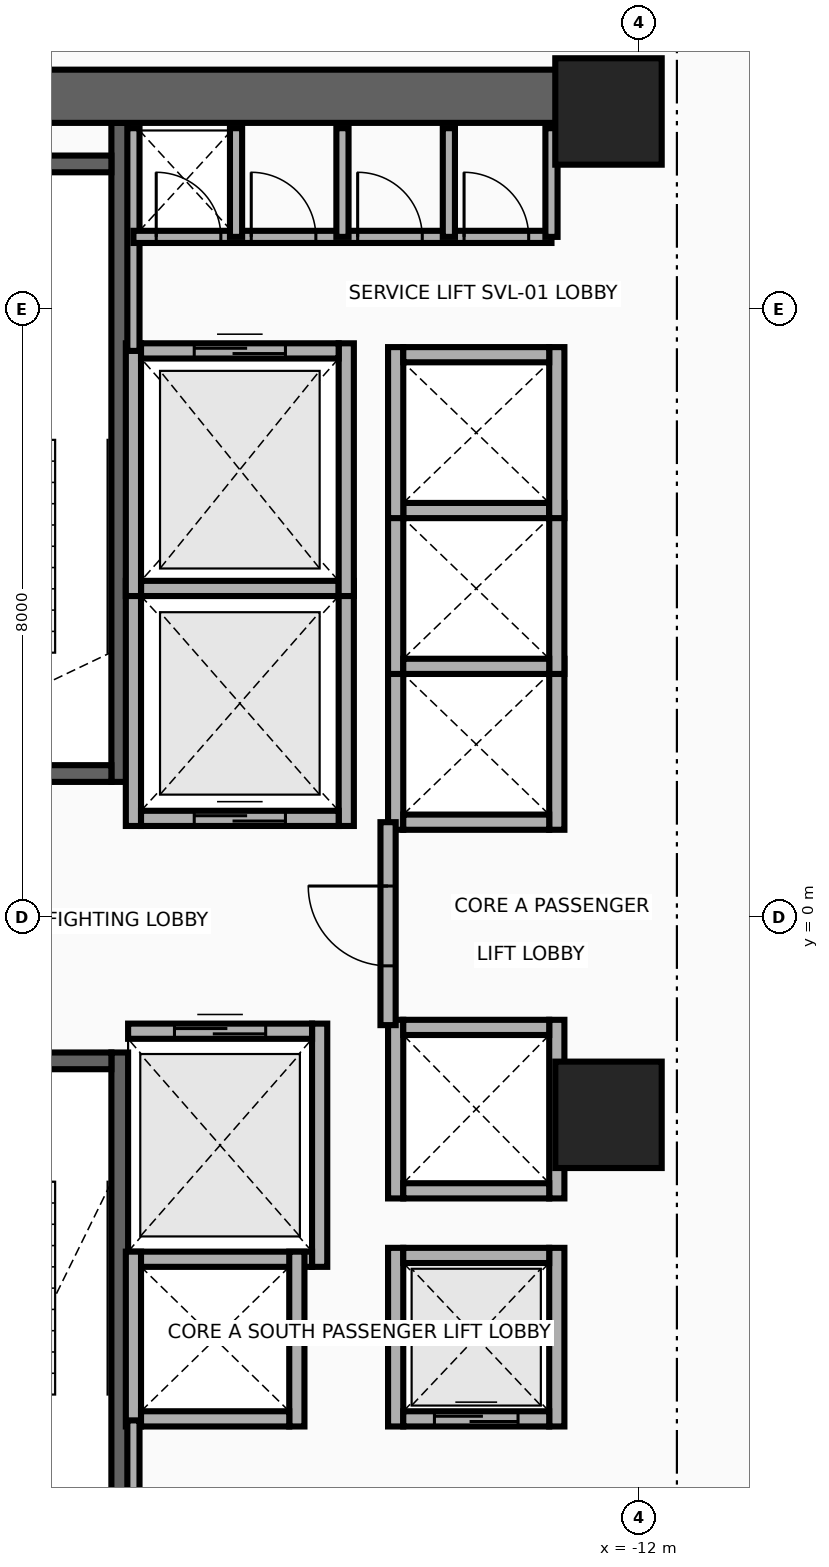
"""IFC4 building model, lengths in metres.
Left out: names, types, materials, properties, quantities, classifications, styles, units other than length and angle.
Written with IfcOpenShell. Run it as: python <this file> out.ifc"""

import sys

from ifc_helpers import new_model, si_unit, direction, frame, frame_2d, origin, origin_2d, place, context, subcontext, project, spatial, rectangle, extrude, source, transform, mapped, element, fill, save


model = new_model("IFC4")
c1 = context("Model", 3, precision=1e-05, world=origin(), true_north=direction((0.0, 1.0)))
c2 = subcontext(c1, "Body", "Model", "MODEL_VIEW")
j1 = project(units=[si_unit("LENGTHUNIT", "METRE"), si_unit("PLANEANGLEUNIT", "RADIAN")], contexts=[c1])
p1 = place(None, origin())
s1 = spatial("IfcSite", under=j1, at=p1, CompositionType="ELEMENT")
p2 = place(p1, origin())
s2 = spatial("IfcBuilding", under=s1, at=p2, CompositionType="ELEMENT")
p3 = place(p2, frame((0.0, 0.0, 92.6)))
s3 = spatial("IfcBuildingStorey", under=s2, at=p3, CompositionType="ELEMENT", Elevation=92.6)
p4 = place(p3, frame((-18.83, 1.78, 0.0), z_axis=(0.0, 0.0, 1.0), x_axis=(0.0, 1.0, 0.0)))
e1 = element("IfcWall", 1, at=p4, inside=s3, PredefinedType="SHEAR", context=c2, shape_type="SweptSolid", body=[
    extrude(rectangle(XDim=8.67, YDim=0.22, at=frame_2d((4.335, 0.0))), origin(), (0.0, 0.0, 1.0), 3.46),
])
p5 = place(p3, frame((-22.05, 1.89, 0.0), z_axis=(0.0, 0.0, 1.0), x_axis=(1.0, 0.0, 0.0)))
e2 = element("IfcWall", 2, at=p5, inside=s3, PredefinedType="SHEAR", context=c2, shape_type="SweptSolid", body=[
    extrude(rectangle(XDim=3.11, YDim=0.22, at=frame_2d((1.555, 0.0))), origin(), (0.0, 0.0, 1.0), 3.46),
])
p6 = place(p5, frame((1.0, 0.0, 0.0)))
e3 = element("IfcOpeningElement", 3, at=p6, cuts=e2, PredefinedType="OPENING", context=c2, shape_type="SweptSolid", body=[
    extrude(rectangle(XDim=1.1, YDim=2.15, at=frame_2d((0.55, 1.075))), frame((0.0, 0.125, 0.0), z_axis=(0.0, -1.0, 0.0), x_axis=(1.0, 0.0, 0.0)), (0.0, 0.0, 1.0), 0.25),
])
p7 = place(p3, frame((-22.05, 9.91, 0.0), z_axis=(0.0, 0.0, 1.0), x_axis=(1.0, 0.0, 0.0)))
e4 = element("IfcWall", 4, at=p7, inside=s3, PredefinedType="SHEAR", context=c2, shape_type="SweptSolid", body=[
    extrude(rectangle(XDim=3.11, YDim=0.22, at=frame_2d((1.555, 0.0))), origin(), (0.0, 0.0, 1.0), 3.46),
])
p8 = place(p3, frame((-18.83, -10.45, 0.0), z_axis=(0.0, 0.0, 1.0), x_axis=(0.0, 1.0, 0.0)))
e5 = element("IfcWall", 5, at=p8, inside=s3, PredefinedType="SHEAR", context=c2, shape_type="SweptSolid", body=[
    extrude(rectangle(XDim=8.67, YDim=0.22, at=frame_2d((4.335, 0.0))), origin(), (0.0, 0.0, 1.0), 3.46),
])
p9 = place(p3, frame((-22.05, -1.89, 0.0), z_axis=(0.0, 0.0, 1.0), x_axis=(1.0, 0.0, 0.0)))
e6 = element("IfcWall", 6, at=p9, inside=s3, PredefinedType="SHEAR", context=c2, shape_type="SweptSolid", body=[
    extrude(rectangle(XDim=3.11, YDim=0.22, at=frame_2d((1.555, 0.0))), origin(), (0.0, 0.0, 1.0), 3.46),
])
p10 = place(p9, frame((1.0, 0.0, 0.0)))
e7 = element("IfcOpeningElement", 7, at=p10, cuts=e6, PredefinedType="OPENING", context=c2, shape_type="SweptSolid", body=[
    extrude(rectangle(XDim=1.1, YDim=2.15, at=frame_2d((0.55, 1.075))), frame((0.0, 0.125, 0.0), z_axis=(0.0, -1.0, 0.0), x_axis=(1.0, 0.0, 0.0)), (0.0, 0.0, 1.0), 0.25),
])
p11 = place(p3, frame((-22.65, 10.8, 0.0), z_axis=(0.0, 0.0, 1.0), x_axis=(1.0, 0.0, 0.0)))
e8 = element("IfcWall", 8, at=p11, inside=s3, PredefinedType="SHEAR", context=c2, shape_type="SweptSolid", body=[
    extrude(rectangle(XDim=10.25, YDim=0.7, at=frame_2d((5.125, 0.0))), origin(), (0.0, 0.0, 1.0), 3.46),
])
m1 = source(origin(), c2, "Body", "SweptSolid", [
    extrude(rectangle(XDim=1.4, YDim=1.4, at=origin_2d()), origin(), (0.0, 0.0, 1.0), 3.7),
])
for number, where, z_axis, x_axis in (
    (9, (-12.4, -2.6, 0.0), (0.0, 0.0, 1.0), (1.0, 0.0, 0.0)),
    (10, (-12.4, 10.6, 0.0), (0.0, 0.0, 1.0), (1.0, 0.0, 0.0)),
):
    element("IfcColumn", number, at=place(p3, frame(where, z_axis=z_axis, x_axis=x_axis)), inside=s3, PredefinedType="COLUMN", context=c2, shape_type="MappedRepresentation", body=[
        mapped(m1, transform((0.0, 0.0, 0.0), x_axis=(1.0, 0.0, 0.0), y_axis=(0.0, 1.0, 0.0), z_axis=(0.0, 0.0, 1.0), scale=1.0)),
    ])
for number, where, z_axis, x_axis in (
    (11, (-18.65, 1.2, 0.0), (0.0, 0.0, 1.0), (0.0, 1.0, 0.0)),
    (12, (-15.85, 1.2, 0.0), (0.0, 0.0, 1.0), (0.0, 1.0, 0.0)),
):
    element("IfcWall", number, at=place(p3, frame(where, z_axis=z_axis, x_axis=x_axis)), inside=s3, PredefinedType="MOVABLE", context=c2, shape_type="SweptSolid", body=[
        extrude(rectangle(XDim=3.225, YDim=0.2, at=frame_2d((1.613, 0.0))), origin(), (0.0, 0.0, 1.0), 3.46),
    ])
p12 = place(p3, frame((-18.55, 1.3, 0.0), z_axis=(0.0, 0.0, 1.0), x_axis=(1.0, 0.0, 0.0)))
e13 = element("IfcWall", 13, at=p12, inside=s3, PredefinedType="MOVABLE", context=c2, shape_type="SweptSolid", body=[
    extrude(rectangle(XDim=2.6, YDim=0.2, at=frame_2d((1.3, 0.0))), origin(), (0.0, 0.0, 1.0), 3.46),
])
p13 = place(p12, frame((0.7, 0.0, 0.0)))
e14 = element("IfcOpeningElement", 14, at=p13, cuts=e13, PredefinedType="OPENING", context=c2, shape_type="SweptSolid", body=[
    extrude(rectangle(XDim=1.2, YDim=2.1, at=frame_2d((0.6, 1.05))), frame((0.0, 0.115, 0.0), z_axis=(0.0, -1.0, 0.0), x_axis=(1.0, 0.0, 0.0)), (0.0, 0.0, 1.0), 0.23),
])
p14 = place(p3, frame((-18.55, 4.325, 0.0), z_axis=(0.0, 0.0, 1.0), x_axis=(1.0, 0.0, 0.0)))
e15 = element("IfcWall", 15, at=p14, inside=s3, PredefinedType="MOVABLE", context=c2, shape_type="SweptSolid", body=[
    extrude(rectangle(XDim=2.6, YDim=0.2, at=frame_2d((1.3, 0.0))), origin(), (0.0, 0.0, 1.0), 3.46),
])
p15 = place(p3, frame((-16.2, -4.6, 0.0), z_axis=(0.0, 0.0, 1.0), x_axis=(0.0, 1.0, 0.0)))
e16 = element("IfcWall", 16, at=p15, inside=s3, PredefinedType="MOVABLE", context=c2, shape_type="SweptSolid", body=[
    extrude(rectangle(XDim=3.2, YDim=0.2, at=frame_2d((1.6, 0.0))), origin(), (0.0, 0.0, 1.0), 3.46),
])
p16 = place(p3, frame((-18.72, -4.5, 0.0), z_axis=(0.0, 0.0, 1.0), x_axis=(1.0, 0.0, 0.0)))
e17 = element("IfcWall", 17, at=p16, inside=s3, PredefinedType="MOVABLE", context=c2, shape_type="SweptSolid", body=[
    extrude(rectangle(XDim=2.42, YDim=0.2, at=frame_2d((1.21, 0.0))), origin(), (0.0, 0.0, 1.0), 3.46),
])
p17 = place(p3, frame((-18.72, -1.5, 0.0), z_axis=(0.0, 0.0, 1.0), x_axis=(1.0, 0.0, 0.0)))
e18 = element("IfcWall", 18, at=p17, inside=s3, PredefinedType="MOVABLE", context=c2, shape_type="SweptSolid", body=[
    extrude(rectangle(XDim=2.42, YDim=0.2, at=frame_2d((1.21, 0.0))), origin(), (0.0, 0.0, 1.0), 3.46),
])
p18 = place(p17, frame((0.61, 0.0, 0.0)))
e19 = element("IfcOpeningElement", 19, at=p18, cuts=e18, PredefinedType="OPENING", context=c2, shape_type="SweptSolid", body=[
    extrude(rectangle(XDim=1.2, YDim=2.1, at=frame_2d((0.6, 1.05))), frame((0.0, 0.115, 0.0), z_axis=(0.0, -1.0, 0.0), x_axis=(1.0, 0.0, 0.0)), (0.0, 0.0, 1.0), 0.23),
])
for number, where, z_axis, x_axis in (
    (20, (-18.65, 4.225, 0.0), (0.0, 0.0, 1.0), (0.0, 1.0, 0.0)),
    (21, (-15.85, 4.225, 0.0), (0.0, 0.0, 1.0), (0.0, 1.0, 0.0)),
):
    element("IfcWall", number, at=place(p3, frame(where, z_axis=z_axis, x_axis=x_axis)), inside=s3, PredefinedType="MOVABLE", context=c2, shape_type="SweptSolid", body=[
        extrude(rectangle(XDim=3.325, YDim=0.2, at=frame_2d((1.663, 0.0))), origin(), (0.0, 0.0, 1.0), 3.46),
    ])
p19 = place(p3, frame((-18.55, 7.45, 0.0), z_axis=(0.0, 0.0, 1.0), x_axis=(1.0, 0.0, 0.0)))
e22 = element("IfcWall", 22, at=p19, inside=s3, PredefinedType="MOVABLE", context=c2, shape_type="SweptSolid", body=[
    extrude(rectangle(XDim=2.6, YDim=0.2, at=frame_2d((1.3, 0.0))), origin(), (0.0, 0.0, 1.0), 3.46),
])
p20 = place(p19, frame((0.7, 0.0, 0.0)))
e23 = element("IfcOpeningElement", 23, at=p20, cuts=e22, PredefinedType="OPENING", context=c2, shape_type="SweptSolid", body=[
    extrude(rectangle(XDim=1.2, YDim=2.1, at=frame_2d((0.6, 1.05))), frame((0.0, 0.115, 0.0), z_axis=(0.0, -1.0, 0.0), x_axis=(1.0, 0.0, 0.0)), (0.0, 0.0, 1.0), 0.23),
])
for number, where, z_axis, x_axis in (
    (24, (-15.2, -6.7, 0.0), (0.0, 0.0, 1.0), (0.0, 1.0, 0.0)),
    (25, (-13.08, -6.7, 0.0), (0.0, 0.0, 1.0), (0.0, 1.0, 0.0)),
):
    element("IfcWall", number, at=place(p3, frame(where, z_axis=z_axis, x_axis=x_axis)), inside=s3, PredefinedType="MOVABLE", context=c2, shape_type="SweptSolid", body=[
        extrude(rectangle(XDim=2.35, YDim=0.2, at=frame_2d((1.175, 0.0))), origin(), (0.0, 0.0, 1.0), 3.46),
    ])
p21 = place(p3, frame((-15.1, -6.6, 0.0), z_axis=(0.0, 0.0, 1.0), x_axis=(1.0, 0.0, 0.0)))
e26 = element("IfcWall", 26, at=p21, inside=s3, PredefinedType="MOVABLE", context=c2, shape_type="SweptSolid", body=[
    extrude(rectangle(XDim=1.92, YDim=0.2, at=frame_2d((0.96, 0.0))), origin(), (0.0, 0.0, 1.0), 3.46),
])
p22 = place(p21, frame((0.41, 0.0, 0.0)))
e27 = element("IfcOpeningElement", 27, at=p22, cuts=e26, PredefinedType="OPENING", context=c2, shape_type="SweptSolid", body=[
    extrude(rectangle(XDim=1.1, YDim=2.1, at=frame_2d((0.55, 1.05))), frame((0.0, 0.115, 0.0), z_axis=(0.0, -1.0, 0.0), x_axis=(1.0, 0.0, 0.0)), (0.0, 0.0, 1.0), 0.23),
])
p23 = place(p3, frame((-15.1, -4.45, 0.0), z_axis=(0.0, 0.0, 1.0), x_axis=(1.0, 0.0, 0.0)))
e28 = element("IfcWall", 28, at=p23, inside=s3, PredefinedType="MOVABLE", context=c2, shape_type="SweptSolid", body=[
    extrude(rectangle(XDim=1.92, YDim=0.2, at=frame_2d((0.96, 0.0))), origin(), (0.0, 0.0, 1.0), 3.46),
])
for number, where, z_axis, x_axis in (
    (29, (-15.2, 1.15, 0.0), (0.0, 0.0, 1.0), (0.0, 1.0, 0.0)),
    (30, (-13.08, 1.15, 0.0), (0.0, 0.0, 1.0), (0.0, 1.0, 0.0)),
):
    element("IfcWall", number, at=place(p3, frame(where, z_axis=z_axis, x_axis=x_axis)), inside=s3, PredefinedType="MOVABLE", context=c2, shape_type="SweptSolid", body=[
        extrude(rectangle(XDim=2.25, YDim=0.2, at=frame_2d((1.125, 0.0))), origin(), (0.0, 0.0, 1.0), 3.46),
    ])
p24 = place(p3, frame((-15.1, 1.25, 0.0), z_axis=(0.0, 0.0, 1.0), x_axis=(1.0, 0.0, 0.0)))
e31 = element("IfcWall", 31, at=p24, inside=s3, PredefinedType="MOVABLE", context=c2, shape_type="SweptSolid", body=[
    extrude(rectangle(XDim=1.92, YDim=0.2, at=frame_2d((0.96, 0.0))), origin(), (0.0, 0.0, 1.0), 3.46),
])
for number, where, z_axis, x_axis in (
    (32, (-15.2, 3.2, 0.0), (0.0, 0.0, 1.0), (0.0, 1.0, 0.0)),
    (33, (-13.08, 3.2, 0.0), (0.0, 0.0, 1.0), (0.0, 1.0, 0.0)),
):
    element("IfcWall", number, at=place(p3, frame(where, z_axis=z_axis, x_axis=x_axis)), inside=s3, PredefinedType="MOVABLE", context=c2, shape_type="SweptSolid", body=[
        extrude(rectangle(XDim=2.25, YDim=0.2, at=frame_2d((1.125, 0.0))), origin(), (0.0, 0.0, 1.0), 3.46),
    ])
for number, where, z_axis, x_axis in (
    (34, (-15.1, 3.3, 0.0), (0.0, 0.0, 1.0), (1.0, 0.0, 0.0)),
    (35, (-15.1, 5.35, 0.0), (0.0, 0.0, 1.0), (1.0, 0.0, 0.0)),
):
    element("IfcWall", number, at=place(p3, frame(where, z_axis=z_axis, x_axis=x_axis)), inside=s3, PredefinedType="MOVABLE", context=c2, shape_type="SweptSolid", body=[
        extrude(rectangle(XDim=1.92, YDim=0.2, at=frame_2d((0.96, 0.0))), origin(), (0.0, 0.0, 1.0), 3.46),
    ])
for number, where, z_axis, x_axis in (
    (36, (-15.2, 5.25, 0.0), (0.0, 0.0, 1.0), (0.0, 1.0, 0.0)),
    (37, (-13.08, 5.25, 0.0), (0.0, 0.0, 1.0), (0.0, 1.0, 0.0)),
):
    element("IfcWall", number, at=place(p3, frame(where, z_axis=z_axis, x_axis=x_axis)), inside=s3, PredefinedType="MOVABLE", context=c2, shape_type="SweptSolid", body=[
        extrude(rectangle(XDim=2.25, YDim=0.2, at=frame_2d((1.125, 0.0))), origin(), (0.0, 0.0, 1.0), 3.46),
    ])
p25 = place(p3, frame((-15.1, 7.4, 0.0), z_axis=(0.0, 0.0, 1.0), x_axis=(1.0, 0.0, 0.0)))
e38 = element("IfcWall", 38, at=p25, inside=s3, PredefinedType="MOVABLE", context=c2, shape_type="SweptSolid", body=[
    extrude(rectangle(XDim=1.92, YDim=0.2, at=frame_2d((0.96, 0.0))), origin(), (0.0, 0.0, 1.0), 3.46),
])
for number, where, z_axis, x_axis in (
    (39, (-18.65, -6.7, 0.0), (0.0, 0.0, 1.0), (0.0, 1.0, 0.0)),
    (40, (-16.5, -6.7, 0.0), (0.0, 0.0, 1.0), (0.0, 1.0, 0.0)),
):
    element("IfcWall", number, at=place(p3, frame(where, z_axis=z_axis, x_axis=x_axis)), inside=s3, PredefinedType="MOVABLE", context=c2, shape_type="SweptSolid", body=[
        extrude(rectangle(XDim=2.3, YDim=0.2, at=frame_2d((1.15, 0.0))), origin(), (0.0, 0.0, 1.0), 3.46),
    ])
p26 = place(p3, frame((-18.55, -6.6, 0.0), z_axis=(0.0, 0.0, 1.0), x_axis=(1.0, 0.0, 0.0)))
e41 = element("IfcWall", 41, at=p26, inside=s3, PredefinedType="MOVABLE", context=c2, shape_type="SweptSolid", body=[
    extrude(rectangle(XDim=1.95, YDim=0.2, at=frame_2d((0.975, 0.0))), origin(), (0.0, 0.0, 1.0), 3.46),
])
for number, where, z_axis, x_axis in (
    (42, (-15.2, -3.7, 0.0), (0.0, 0.0, 1.0), (0.0, 1.0, 0.0)),
    (43, (-13.08, -3.7, 0.0), (0.0, 0.0, 1.0), (0.0, 1.0, 0.0)),
):
    element("IfcWall", number, at=place(p3, frame(where, z_axis=z_axis, x_axis=x_axis)), inside=s3, PredefinedType="MOVABLE", context=c2, shape_type="SweptSolid", body=[
        extrude(rectangle(XDim=2.35, YDim=0.2, at=frame_2d((1.175, 0.0))), origin(), (0.0, 0.0, 1.0), 3.46),
    ])
for number, where, z_axis, x_axis in (
    (44, (-15.1, -3.6, 0.0), (0.0, 0.0, 1.0), (1.0, 0.0, 0.0)),
    (45, (-15.1, -1.45, 0.0), (0.0, 0.0, 1.0), (1.0, 0.0, 0.0)),
):
    element("IfcWall", number, at=place(p3, frame(where, z_axis=z_axis, x_axis=x_axis)), inside=s3, PredefinedType="MOVABLE", context=c2, shape_type="SweptSolid", body=[
        extrude(rectangle(XDim=1.92, YDim=0.2, at=frame_2d((0.96, 0.0))), origin(), (0.0, 0.0, 1.0), 3.46),
    ])
p27 = place(p3, frame((-15.3, -1.42, 0.0), z_axis=(0.0, 0.0, 1.0), x_axis=(0.0, 1.0, 0.0)))
e46 = element("IfcWall", 46, at=p27, inside=s3, PredefinedType="PARTITIONING", context=c2, shape_type="SweptSolid", body=[
    extrude(rectangle(XDim=2.67, YDim=0.2, at=frame_2d((1.335, 0.0))), origin(), (0.0, 0.0, 1.0), 3.46),
])
p28 = place(p27, frame((0.78, 0.0, 0.0)))
e47 = element("IfcOpeningElement", 47, at=p28, cuts=e46, PredefinedType="OPENING", context=c2, shape_type="SweptSolid", body=[
    extrude(rectangle(XDim=1.05, YDim=2.15, at=frame_2d((0.525, 1.075))), frame((0.0, 0.115, 0.0), z_axis=(0.0, -1.0, 0.0), x_axis=(1.0, 0.0, 0.0)), (0.0, 0.0, 1.0), 0.23),
])
p29 = place(p3, frame((-18.65, 7.45, 0.0), z_axis=(0.0, 0.0, 1.0), x_axis=(0.0, 1.0, 0.0)))
e48 = element("IfcWall", 48, at=p29, inside=s3, PredefinedType="PARTITIONING", context=c2, shape_type="SweptSolid", body=[
    extrude(rectangle(XDim=2.93, YDim=0.16, at=frame_2d((1.465, 0.0))), origin(), (0.0, 0.0, 1.0), 3.46),
])
p30 = place(p3, frame((-18.65, -8.18, 0.0), z_axis=(0.0, 0.0, 1.0), x_axis=(0.0, 1.0, 0.0)))
e49 = element("IfcWall", 49, at=p30, inside=s3, PredefinedType="PARTITIONING", context=c2, shape_type="SweptSolid", body=[
    extrude(rectangle(XDim=1.56, YDim=0.16, at=frame_2d((0.78, 0.0))), origin(), (0.0, 0.0, 1.0), 3.46),
])
p31 = place(p3, frame((-18.65, 8.95, 0.0), z_axis=(0.0, 0.0, 1.0), x_axis=(1.0, 0.0, 0.0)))
e50 = element("IfcWall", 50, at=p31, inside=s3, PredefinedType="PARTITIONING", context=c2, shape_type="SweptSolid", body=[
    extrude(rectangle(XDim=5.5, YDim=0.16, at=frame_2d((2.75, 0.0))), origin(), (0.0, 0.0, 1.0), 3.46),
])
p32 = place(p31, frame((0.3, 0.0, 0.0)))
e51 = element("IfcOpeningElement", 51, at=p32, cuts=e50, PredefinedType="OPENING", context=c2, shape_type="SweptSolid", body=[
    extrude(rectangle(XDim=0.85, YDim=2.05, at=frame_2d((0.425, 1.025))), frame((0.0, 0.095, 0.0), z_axis=(0.0, -1.0, 0.0), x_axis=(1.0, 0.0, 0.0)), (0.0, 0.0, 1.0), 0.19),
])
p33 = place(p31, frame((1.55, 0.0, 0.0)))
e52 = element("IfcOpeningElement", 52, at=p33, cuts=e50, PredefinedType="OPENING", context=c2, shape_type="SweptSolid", body=[
    extrude(rectangle(XDim=0.85, YDim=2.05, at=frame_2d((0.425, 1.025))), frame((0.0, 0.095, 0.0), z_axis=(0.0, -1.0, 0.0), x_axis=(1.0, 0.0, 0.0)), (0.0, 0.0, 1.0), 0.19),
])
p34 = place(p31, frame((2.95, 0.0, 0.0)))
e53 = element("IfcOpeningElement", 53, at=p34, cuts=e50, PredefinedType="OPENING", context=c2, shape_type="SweptSolid", body=[
    extrude(rectangle(XDim=0.85, YDim=2.05, at=frame_2d((0.425, 1.025))), frame((0.0, 0.095, 0.0), z_axis=(0.0, -1.0, 0.0), x_axis=(1.0, 0.0, 0.0)), (0.0, 0.0, 1.0), 0.19),
])
p35 = place(p31, frame((4.35, 0.0, 0.0)))
e54 = element("IfcOpeningElement", 54, at=p35, cuts=e50, PredefinedType="OPENING", context=c2, shape_type="SweptSolid", body=[
    extrude(rectangle(XDim=0.85, YDim=2.05, at=frame_2d((0.425, 1.025))), frame((0.0, 0.095, 0.0), z_axis=(0.0, -1.0, 0.0), x_axis=(1.0, 0.0, 0.0)), (0.0, 0.0, 1.0), 0.19),
])
for number, where, z_axis, x_axis in (
    (55, (-13.15, 8.95, 0.0), (0.0, 0.0, 1.0), (0.0, 1.0, 0.0)),
    (56, (-17.3, 8.95, 0.0), (0.0, 0.0, 1.0), (0.0, 1.0, 0.0)),
    (57, (-15.9, 8.95, 0.0), (0.0, 0.0, 1.0), (0.0, 1.0, 0.0)),
    (58, (-14.5, 8.95, 0.0), (0.0, 0.0, 1.0), (0.0, 1.0, 0.0)),
):
    element("IfcWall", number, at=place(p3, frame(where, z_axis=z_axis, x_axis=x_axis)), inside=s3, PredefinedType="PARTITIONING", context=c2, shape_type="SweptSolid", body=[
        extrude(rectangle(XDim=1.43, YDim=0.16, at=frame_2d((0.715, 0.0))), origin(), (0.0, 0.0, 1.0), 3.46),
    ])
p36 = place(p13, origin())
e59 = element("IfcDoor", 59, at=p36, inside=s3, OperationType="DOUBLE_DOOR_SLIDING", PredefinedType="DOOR", context=c2, shape_type="SweptSolid", body=[
    extrude(rectangle(XDim=1.2, YDim=2.1, at=frame_2d((0.6, 1.05))), frame((0.0, 0.025, 0.0), z_axis=(0.0, -1.0, 0.0), x_axis=(1.0, 0.0, 0.0)), (0.0, 0.0, 1.0), 0.05),
])
fill(e14, e59)
p37 = place(p18, origin())
e60 = element("IfcDoor", 60, at=p37, inside=s3, OperationType="DOUBLE_DOOR_SLIDING", PredefinedType="DOOR", context=c2, shape_type="SweptSolid", body=[
    extrude(rectangle(XDim=1.2, YDim=2.1, at=frame_2d((0.6, 1.05))), frame((0.0, 0.025, 0.0), z_axis=(0.0, -1.0, 0.0), x_axis=(1.0, 0.0, 0.0)), (0.0, 0.0, 1.0), 0.05),
])
fill(e19, e60)
p38 = place(p20, origin())
e61 = element("IfcDoor", 61, at=p38, inside=s3, OperationType="DOUBLE_DOOR_SLIDING", PredefinedType="DOOR", context=c2, shape_type="SweptSolid", body=[
    extrude(rectangle(XDim=1.2, YDim=2.1, at=frame_2d((0.6, 1.05))), frame((0.0, 0.025, 0.0), z_axis=(0.0, -1.0, 0.0), x_axis=(1.0, 0.0, 0.0)), (0.0, 0.0, 1.0), 0.05),
])
fill(e23, e61)
p39 = place(p22, origin())
e62 = element("IfcDoor", 62, at=p39, inside=s3, OperationType="DOUBLE_DOOR_SLIDING", PredefinedType="DOOR", context=c2, shape_type="SweptSolid", body=[
    extrude(rectangle(XDim=1.1, YDim=2.1, at=frame_2d((0.55, 1.05))), frame((0.0, 0.025, 0.0), z_axis=(0.0, -1.0, 0.0), x_axis=(1.0, 0.0, 0.0)), (0.0, 0.0, 1.0), 0.05),
])
fill(e27, e62)
p40 = place(p28, origin())
e63 = element("IfcDoor", 63, at=p40, inside=s3, OperationType="SINGLE_SWING_RIGHT", PredefinedType="DOOR", context=c2, shape_type="SweptSolid", body=[
    extrude(rectangle(XDim=1.05, YDim=2.15, at=frame_2d((0.525, 1.075))), frame((0.0, 0.025, 0.0), z_axis=(0.0, -1.0, 0.0), x_axis=(1.0, 0.0, 0.0)), (0.0, 0.0, 1.0), 0.05),
])
fill(e47, e63)
p41 = place(p32, origin())
e64 = element("IfcDoor", 64, at=p41, inside=s3, OperationType="SINGLE_SWING_LEFT", PredefinedType="DOOR", context=c2, shape_type="SweptSolid", body=[
    extrude(rectangle(XDim=0.85, YDim=2.05, at=frame_2d((0.425, 1.025))), frame((0.0, 0.025, 0.0), z_axis=(0.0, -1.0, 0.0), x_axis=(1.0, 0.0, 0.0)), (0.0, 0.0, 1.0), 0.05),
])
fill(e51, e64)
p42 = place(p33, origin())
e65 = element("IfcDoor", 65, at=p42, inside=s3, OperationType="SINGLE_SWING_RIGHT", PredefinedType="DOOR", context=c2, shape_type="SweptSolid", body=[
    extrude(rectangle(XDim=0.85, YDim=2.05, at=frame_2d((0.425, 1.025))), frame((0.0, 0.025, 0.0), z_axis=(0.0, -1.0, 0.0), x_axis=(1.0, 0.0, 0.0)), (0.0, 0.0, 1.0), 0.05),
])
fill(e52, e65)
p43 = place(p34, origin())
e66 = element("IfcDoor", 66, at=p43, inside=s3, OperationType="SINGLE_SWING_LEFT", PredefinedType="DOOR", context=c2, shape_type="SweptSolid", body=[
    extrude(rectangle(XDim=0.85, YDim=2.05, at=frame_2d((0.425, 1.025))), frame((0.0, 0.025, 0.0), z_axis=(0.0, -1.0, 0.0), x_axis=(1.0, 0.0, 0.0)), (0.0, 0.0, 1.0), 0.05),
])
fill(e53, e66)
p44 = place(p35, origin())
e67 = element("IfcDoor", 67, at=p44, inside=s3, OperationType="SINGLE_SWING_RIGHT", PredefinedType="DOOR", context=c2, shape_type="SweptSolid", body=[
    extrude(rectangle(XDim=0.85, YDim=2.05, at=frame_2d((0.425, 1.025))), frame((0.0, 0.025, 0.0), z_axis=(0.0, -1.0, 0.0), x_axis=(1.0, 0.0, 0.0)), (0.0, 0.0, 1.0), 0.05),
])
fill(e54, e67)
save(model, sys.argv[1])
